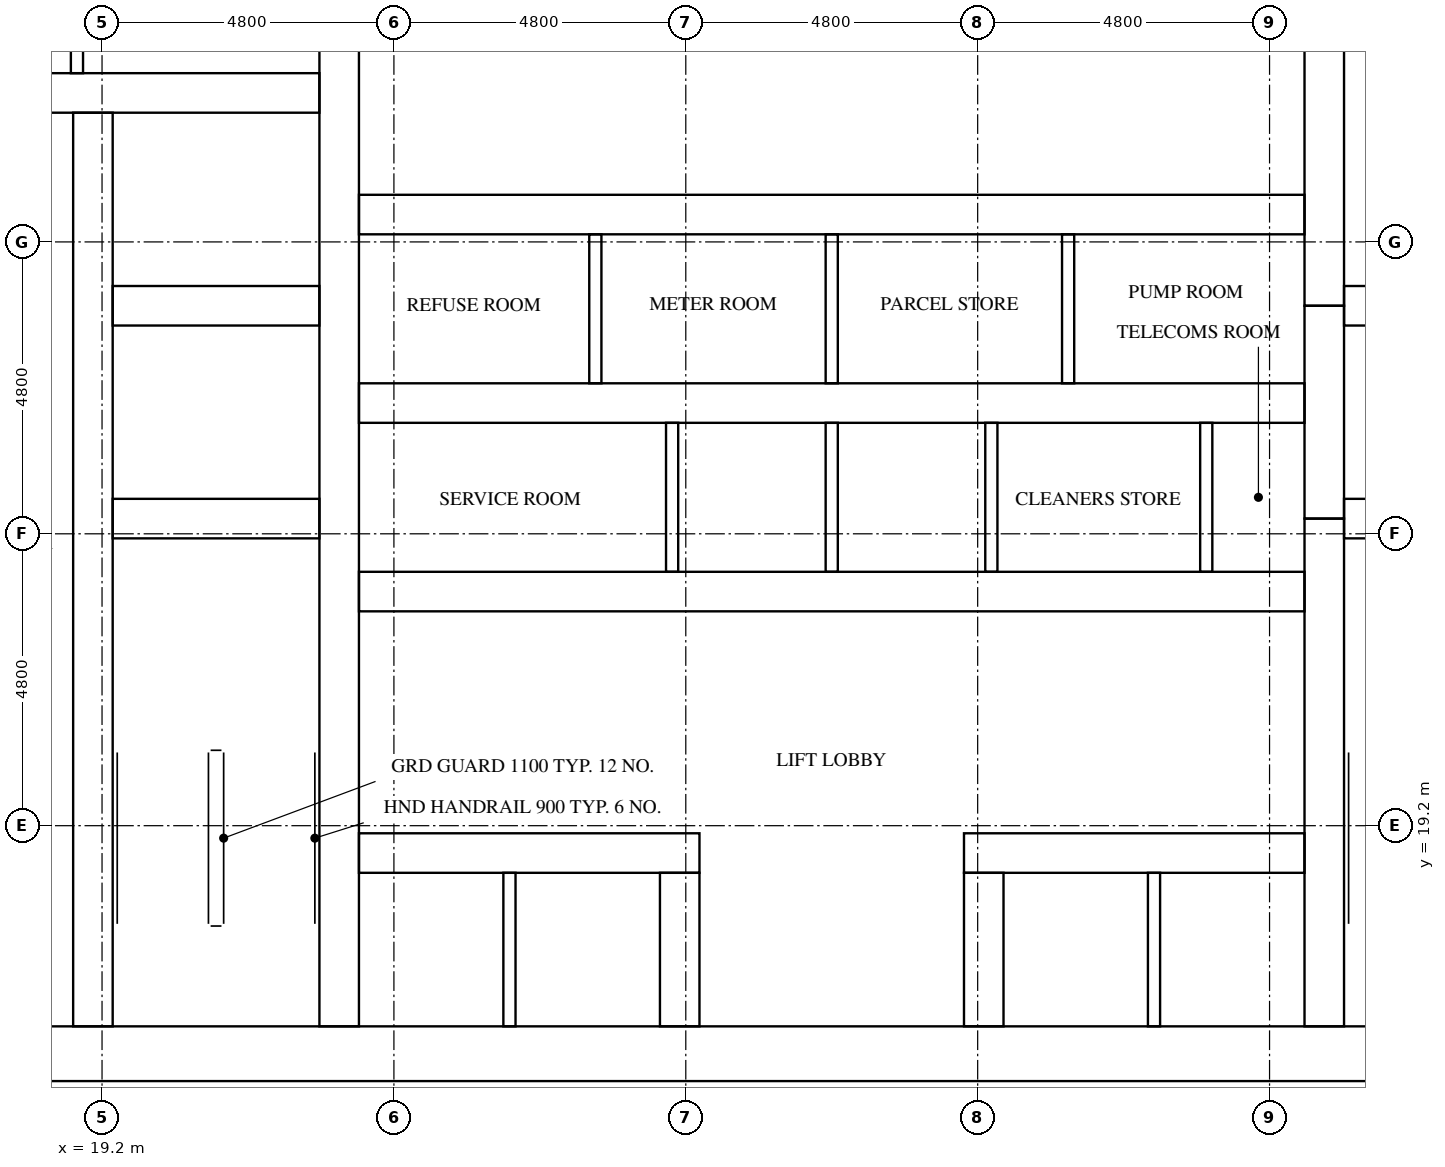
"""IFC4 building model, lengths in metres.
Left out: names, types, materials, properties, quantities, classifications, styles, units other than length and angle.
Written with IfcOpenShell. Run it as: python <this file> out.ifc"""

import sys

from ifc_helpers import new_model, si_unit, direction, frame, frame_2d, origin, place, context, subcontext, project, spatial, rectangle, extrude, element, fill, save


model = new_model("IFC4")
c1 = context("Model", 3, precision=1e-05, world=origin(), true_north=direction((0.0, 1.0)))
c2 = subcontext(c1, "Body", "Model", "MODEL_VIEW")
j1 = project(units=[si_unit("LENGTHUNIT", "METRE"), si_unit("PLANEANGLEUNIT", "RADIAN")], contexts=[c1])
p1 = place(None, origin())
s1 = spatial("IfcSite", under=j1, at=p1, CompositionType="ELEMENT")
p2 = place(p1, origin())
s2 = spatial("IfcBuilding", under=s1, at=p2, CompositionType="ELEMENT")
p3 = place(p2, frame((0.0, 0.0, 103.2)))
s3 = spatial("IfcBuildingStorey", under=s2, at=p3, CompositionType="ELEMENT", Elevation=103.2)
p4 = place(p3, frame((15.0, 15.45, 0.0), z_axis=(0.0, 0.0, 1.0), x_axis=(1.0, 0.0, 0.0)))
e1 = element("IfcWall", 1, at=p4, inside=s3, PredefinedType="SHEAR", context=c2, shape_type="SweptSolid", body=[
    extrude(rectangle(XDim=32.4, YDim=0.9, at=frame_2d((16.2, 0.0))), origin(), (0.0, 0.0, 1.0), 3.2),
])
p5 = place(p4, frame((15.3, 0.0, 0.0)))
e2 = element("IfcOpeningElement", 2, at=p5, cuts=e1, PredefinedType="OPENING", context=c2, shape_type="SweptSolid", body=[
    extrude(rectangle(XDim=1.8, YDim=2.1, at=frame_2d((0.9, 1.05))), frame((0.0, 0.46, 0.0), z_axis=(0.0, -1.0, 0.0), x_axis=(1.0, 0.0, 0.0)), (0.0, 0.0, 1.0), 0.92),
])
p6 = place(p3, frame((19.05, 15.9, 0.0), z_axis=(0.0, 0.0, 1.0), x_axis=(0.0, 1.0, 0.0)))
e3 = element("IfcWall", 3, at=p6, inside=s3, PredefinedType="SHEAR", context=c2, shape_type="SweptSolid", body=[
    extrude(rectangle(XDim=15.025, YDim=0.65, at=frame_2d((7.513, 0.0))), origin(), (0.0, 0.0, 1.0), 3.2),
])
p7 = place(p6, frame((9.55, 0.0, 0.0)))
e4 = element("IfcOpeningElement", 4, at=p7, cuts=e3, PredefinedType="OPENING", context=c2, shape_type="SweptSolid", body=[
    extrude(rectangle(XDim=1.1, YDim=2.1, at=frame_2d((0.55, 1.05))), frame((0.0, 0.335, 0.0), z_axis=(0.0, -1.0, 0.0), x_axis=(1.0, 0.0, 0.0)), (0.0, 0.0, 1.0), 0.67),
])
p8 = place(p6, frame((13.05, 0.0, 0.0)))
e5 = element("IfcOpeningElement", 5, at=p8, cuts=e3, PredefinedType="OPENING", context=c2, shape_type="SweptSolid", body=[
    extrude(rectangle(XDim=1.1, YDim=2.1, at=frame_2d((0.55, 1.05))), frame((0.0, 0.335, 0.0), z_axis=(0.0, -1.0, 0.0), x_axis=(1.0, 0.0, 0.0)), (0.0, 0.0, 1.0), 0.67),
])
p9 = place(p6, frame((0.3, 0.0, 0.0)))
e6 = element("IfcOpeningElement", 6, at=p9, cuts=e3, PredefinedType="OPENING", context=c2, shape_type="SweptSolid", body=[
    extrude(rectangle(XDim=1.2, YDim=2.1, at=frame_2d((0.6, 1.05))), frame((0.0, 0.335, 0.0), z_axis=(0.0, -1.0, 0.0), x_axis=(1.0, 0.0, 0.0)), (0.0, 0.0, 1.0), 0.67),
])
p10 = place(p3, frame((23.1, 15.9, 0.0), z_axis=(0.0, 0.0, 1.0), x_axis=(0.0, 1.0, 0.0)))
e7 = element("IfcWall", 7, at=p10, inside=s3, PredefinedType="SHEAR", context=c2, shape_type="SweptSolid", body=[
    extrude(rectangle(XDim=21.0, YDim=0.65, at=frame_2d((10.5, 0.0))), origin(), (0.0, 0.0, 1.0), 3.2),
])
p11 = place(p3, frame((39.3, 15.9, 0.0), z_axis=(0.0, 0.0, 1.0), x_axis=(0.0, 1.0, 0.0)))
e8 = element("IfcWall", 8, at=p11, inside=s3, PredefinedType="SHEAR", context=c2, shape_type="SweptSolid", body=[
    extrude(rectangle(XDim=8.35, YDim=0.65, at=frame_2d((4.175, 0.0))), origin(), (0.0, 0.0, 1.0), 3.2),
])
p12 = place(p3, frame((39.3, 24.25, 0.0), z_axis=(0.0, 0.0, 1.0), x_axis=(0.0, 1.0, 0.0)))
e9 = element("IfcWall", 9, at=p12, inside=s3, PredefinedType="SHEAR", context=c2, shape_type="SweptSolid", body=[
    extrude(rectangle(XDim=3.5, YDim=0.65, at=frame_2d((1.75, 0.0))), origin(), (0.0, 0.0, 1.0), 3.2),
])
p13 = place(p3, frame((39.3, 27.75, 0.0), z_axis=(0.0, 0.0, 1.0), x_axis=(0.0, 1.0, 0.0)))
e10 = element("IfcWall", 10, at=p13, inside=s3, PredefinedType="SHEAR", context=c2, shape_type="SweptSolid", body=[
    extrude(rectangle(XDim=9.15, YDim=0.65, at=frame_2d((4.575, 0.0))), origin(), (0.0, 0.0, 1.0), 3.2),
])
for number, where, z_axis, x_axis in (
    (11, (19.375, 24.25, 0.0), (0.0, 0.0, 1.0), (1.0, 0.0, 0.0)),
    (12, (19.375, 27.75, 0.0), (0.0, 0.0, 1.0), (1.0, 0.0, 0.0)),
):
    element("IfcWall", number, at=place(p3, frame(where, z_axis=z_axis, x_axis=x_axis)), inside=s3, PredefinedType="SHEAR", context=c2, shape_type="SweptSolid", body=[
        extrude(rectangle(XDim=3.4, YDim=0.65, at=frame_2d((1.7, 0.0))), origin(), (0.0, 0.0, 1.0), 3.2),
    ])
p14 = place(p3, frame((15.9, 31.25, 0.0), z_axis=(0.0, 0.0, 1.0), x_axis=(1.0, 0.0, 0.0)))
e13 = element("IfcWall", 13, at=p14, inside=s3, PredefinedType="SHEAR", context=c2, shape_type="SweptSolid", body=[
    extrude(rectangle(XDim=6.875, YDim=0.65, at=frame_2d((3.438, 0.0))), origin(), (0.0, 0.0, 1.0), 3.2),
])
for number, where, z_axis, x_axis in (
    (14, (39.625, 24.25, 0.0), (0.0, 0.0, 1.0), (1.0, 0.0, 0.0)),
    (15, (39.625, 27.75, 0.0), (0.0, 0.0, 1.0), (1.0, 0.0, 0.0)),
):
    element("IfcWall", number, at=place(p3, frame(where, z_axis=z_axis, x_axis=x_axis)), inside=s3, PredefinedType="SHEAR", context=c2, shape_type="SweptSolid", body=[
        extrude(rectangle(XDim=3.4, YDim=0.65, at=frame_2d((1.7, 0.0))), origin(), (0.0, 0.0, 1.0), 3.2),
    ])
p15 = place(p3, frame((23.425, 18.75, 0.0), z_axis=(0.0, 0.0, 1.0), x_axis=(1.0, 0.0, 0.0)))
e16 = element("IfcWall", 16, at=p15, inside=s3, PredefinedType="SHEAR", context=c2, shape_type="SweptSolid", body=[
    extrude(rectangle(XDim=5.6, YDim=0.65, at=frame_2d((2.8, 0.0))), origin(), (0.0, 0.0, 1.0), 3.2),
])
p16 = place(p15, frame((0.637, 0.0, 0.0)))
e17 = element("IfcOpeningElement", 17, at=p16, cuts=e16, PredefinedType="OPENING", context=c2, shape_type="SweptSolid", body=[
    extrude(rectangle(XDim=1.1, YDim=2.1, at=frame_2d((0.55, 1.05))), frame((0.0, 0.335, 0.0), z_axis=(0.0, -1.0, 0.0), x_axis=(1.0, 0.0, 0.0)), (0.0, 0.0, 1.0), 0.67),
])
p17 = place(p15, frame((3.212, 0.0, 0.0)))
e18 = element("IfcOpeningElement", 18, at=p17, cuts=e16, PredefinedType="OPENING", context=c2, shape_type="SweptSolid", body=[
    extrude(rectangle(XDim=1.1, YDim=2.1, at=frame_2d((0.55, 1.05))), frame((0.0, 0.335, 0.0), z_axis=(0.0, -1.0, 0.0), x_axis=(1.0, 0.0, 0.0)), (0.0, 0.0, 1.0), 0.67),
])
p18 = place(p3, frame((33.375, 18.75, 0.0), z_axis=(0.0, 0.0, 1.0), x_axis=(1.0, 0.0, 0.0)))
e19 = element("IfcWall", 19, at=p18, inside=s3, PredefinedType="SHEAR", context=c2, shape_type="SweptSolid", body=[
    extrude(rectangle(XDim=5.6, YDim=0.65, at=frame_2d((2.8, 0.0))), origin(), (0.0, 0.0, 1.0), 3.2),
])
p19 = place(p18, frame((1.288, 0.0, 0.0)))
e20 = element("IfcOpeningElement", 20, at=p19, cuts=e19, PredefinedType="OPENING", context=c2, shape_type="SweptSolid", body=[
    extrude(rectangle(XDim=1.1, YDim=2.1, at=frame_2d((0.55, 1.05))), frame((0.0, 0.335, 0.0), z_axis=(0.0, -1.0, 0.0), x_axis=(1.0, 0.0, 0.0)), (0.0, 0.0, 1.0), 0.67),
])
p20 = place(p18, frame((3.863, 0.0, 0.0)))
e21 = element("IfcOpeningElement", 21, at=p20, cuts=e19, PredefinedType="OPENING", context=c2, shape_type="SweptSolid", body=[
    extrude(rectangle(XDim=1.1, YDim=2.1, at=frame_2d((0.55, 1.05))), frame((0.0, 0.335, 0.0), z_axis=(0.0, -1.0, 0.0), x_axis=(1.0, 0.0, 0.0)), (0.0, 0.0, 1.0), 0.67),
])
p21 = place(p3, frame((23.425, 23.05, 0.0), z_axis=(0.0, 0.0, 1.0), x_axis=(1.0, 0.0, 0.0)))
e22 = element("IfcWall", 22, at=p21, inside=s3, PredefinedType="SHEAR", context=c2, shape_type="SweptSolid", body=[
    extrude(rectangle(XDim=15.55, YDim=0.65, at=frame_2d((7.775, 0.0))), origin(), (0.0, 0.0, 1.0), 3.2),
])
p22 = place(p21, frame((2.025, 0.0, 0.0)))
e23 = element("IfcOpeningElement", 23, at=p22, cuts=e22, PredefinedType="OPENING", context=c2, shape_type="SweptSolid", body=[
    extrude(rectangle(XDim=1.0, YDim=2.1, at=frame_2d((0.5, 1.05))), frame((0.0, 0.335, 0.0), z_axis=(0.0, -1.0, 0.0), x_axis=(1.0, 0.0, 0.0)), (0.0, 0.0, 1.0), 0.67),
])
p23 = place(p21, frame((11.667, 0.0, 0.0)))
e24 = element("IfcOpeningElement", 24, at=p23, cuts=e22, PredefinedType="OPENING", context=c2, shape_type="SweptSolid", body=[
    extrude(rectangle(XDim=1.0, YDim=2.1, at=frame_2d((0.5, 1.05))), frame((0.0, 0.335, 0.0), z_axis=(0.0, -1.0, 0.0), x_axis=(1.0, 0.0, 0.0)), (0.0, 0.0, 1.0), 0.67),
])
p24 = place(p21, frame((14.292, 0.0, 0.0)))
e25 = element("IfcOpeningElement", 25, at=p24, cuts=e22, PredefinedType="OPENING", context=c2, shape_type="SweptSolid", body=[
    extrude(rectangle(XDim=1.0, YDim=2.1, at=frame_2d((0.5, 1.05))), frame((0.0, 0.335, 0.0), z_axis=(0.0, -1.0, 0.0), x_axis=(1.0, 0.0, 0.0)), (0.0, 0.0, 1.0), 0.67),
])
p25 = place(p3, frame((23.425, 26.15, 0.0), z_axis=(0.0, 0.0, 1.0), x_axis=(1.0, 0.0, 0.0)))
e26 = element("IfcWall", 26, at=p25, inside=s3, PredefinedType="SHEAR", context=c2, shape_type="SweptSolid", body=[
    extrude(rectangle(XDim=15.55, YDim=0.65, at=frame_2d((7.775, 0.0))), origin(), (0.0, 0.0, 1.0), 3.2),
])
p26 = place(p3, frame((23.425, 29.25, 0.0), z_axis=(0.0, 0.0, 1.0), x_axis=(1.0, 0.0, 0.0)))
e27 = element("IfcWall", 27, at=p26, inside=s3, PredefinedType="SHEAR", context=c2, shape_type="SweptSolid", body=[
    extrude(rectangle(XDim=15.55, YDim=0.65, at=frame_2d((7.775, 0.0))), origin(), (0.0, 0.0, 1.0), 3.2),
])
p27 = place(p26, frame((1.394, 0.0, 0.0)))
e28 = element("IfcOpeningElement", 28, at=p27, cuts=e27, PredefinedType="OPENING", context=c2, shape_type="SweptSolid", body=[
    extrude(rectangle(XDim=1.0, YDim=2.1, at=frame_2d((0.5, 1.05))), frame((0.0, 0.335, 0.0), z_axis=(0.0, -1.0, 0.0), x_axis=(1.0, 0.0, 0.0)), (0.0, 0.0, 1.0), 0.67),
])
p28 = place(p26, frame((5.331, 0.0, 0.0)))
e29 = element("IfcOpeningElement", 29, at=p28, cuts=e27, PredefinedType="OPENING", context=c2, shape_type="SweptSolid", body=[
    extrude(rectangle(XDim=1.0, YDim=2.1, at=frame_2d((0.5, 1.05))), frame((0.0, 0.335, 0.0), z_axis=(0.0, -1.0, 0.0), x_axis=(1.0, 0.0, 0.0)), (0.0, 0.0, 1.0), 0.67),
])
p29 = place(p26, frame((9.219, 0.0, 0.0)))
e30 = element("IfcOpeningElement", 30, at=p29, cuts=e27, PredefinedType="OPENING", context=c2, shape_type="SweptSolid", body=[
    extrude(rectangle(XDim=1.0, YDim=2.1, at=frame_2d((0.5, 1.05))), frame((0.0, 0.335, 0.0), z_axis=(0.0, -1.0, 0.0), x_axis=(1.0, 0.0, 0.0)), (0.0, 0.0, 1.0), 0.67),
])
p30 = place(p26, frame((13.156, 0.0, 0.0)))
e31 = element("IfcOpeningElement", 31, at=p30, cuts=e27, PredefinedType="OPENING", context=c2, shape_type="SweptSolid", body=[
    extrude(rectangle(XDim=1.0, YDim=2.1, at=frame_2d((0.5, 1.05))), frame((0.0, 0.335, 0.0), z_axis=(0.0, -1.0, 0.0), x_axis=(1.0, 0.0, 0.0)), (0.0, 0.0, 1.0), 0.67),
])
for number, where, z_axis, x_axis in (
    (32, (28.7, 15.9, 0.0), (0.0, 0.0, 1.0), (0.0, 1.0, 0.0)),
    (33, (33.7, 15.9, 0.0), (0.0, 0.0, 1.0), (0.0, 1.0, 0.0)),
):
    element("IfcWall", number, at=place(p3, frame(where, z_axis=z_axis, x_axis=x_axis)), inside=s3, PredefinedType="SHEAR", context=c2, shape_type="SweptSolid", body=[
        extrude(rectangle(XDim=2.525, YDim=0.65, at=frame_2d((1.263, 0.0))), origin(), (0.0, 0.0, 1.0), 3.2),
    ])
for number, where, z_axis, x_axis in (
    (34, (28.575, 23.375, 0.0), (0.0, 0.0, 1.0), (0.0, 1.0, 0.0)),
    (35, (31.2, 23.375, 0.0), (0.0, 0.0, 1.0), (0.0, 1.0, 0.0)),
    (36, (33.825, 23.375, 0.0), (0.0, 0.0, 1.0), (0.0, 1.0, 0.0)),
):
    element("IfcWall", number, at=place(p3, frame(where, z_axis=z_axis, x_axis=x_axis)), inside=s3, PredefinedType="SOLIDWALL", context=c2, shape_type="SweptSolid", body=[
        extrude(rectangle(XDim=2.45, YDim=0.2, at=frame_2d((1.225, 0.0))), origin(), (0.0, 0.0, 1.0), 3.2),
    ])
for number, where, z_axis, x_axis in (
    (37, (25.9, 15.9, 0.0), (0.0, 0.0, 1.0), (0.0, 1.0, 0.0)),
    (38, (36.5, 15.9, 0.0), (0.0, 0.0, 1.0), (0.0, 1.0, 0.0)),
):
    element("IfcWall", number, at=place(p3, frame(where, z_axis=z_axis, x_axis=x_axis)), inside=s3, PredefinedType="SOLIDWALL", context=c2, shape_type="SweptSolid", body=[
        extrude(rectangle(XDim=2.525, YDim=0.2, at=frame_2d((1.263, 0.0))), origin(), (0.0, 0.0, 1.0), 3.2),
    ])
p31 = place(p3, frame((18.788, 31.575, 0.0), z_axis=(0.0, 0.0, 1.0), x_axis=(0.0, 1.0, 0.0)))
e39 = element("IfcWall", 39, at=p31, inside=s3, PredefinedType="PARTITIONING", context=c2, shape_type="SweptSolid", body=[
    extrude(rectangle(XDim=5.325, YDim=0.2, at=frame_2d((2.663, 0.0))), origin(), (0.0, 0.0, 1.0), 3.2),
])
for number, where, z_axis, x_axis in (
    (40, (37.359, 23.375, 0.0), (0.0, 0.0, 1.0), (0.0, 1.0, 0.0)),
    (41, (27.312, 26.475, 0.0), (0.0, 0.0, 1.0), (0.0, 1.0, 0.0)),
    (42, (31.2, 26.475, 0.0), (0.0, 0.0, 1.0), (0.0, 1.0, 0.0)),
    (43, (35.087, 26.475, 0.0), (0.0, 0.0, 1.0), (0.0, 1.0, 0.0)),
):
    element("IfcWall", number, at=place(p3, frame(where, z_axis=z_axis, x_axis=x_axis)), inside=s3, PredefinedType="PARTITIONING", context=c2, shape_type="SweptSolid", body=[
        extrude(rectangle(XDim=2.45, YDim=0.2, at=frame_2d((1.225, 0.0))), origin(), (0.0, 0.0, 1.0), 3.2),
    ])
p32 = place(p16, origin())
e44 = element("IfcDoor", 44, at=p32, inside=s3, OperationType="DOUBLE_DOOR_SLIDING", PredefinedType="DOOR", context=c2, shape_type="SweptSolid", body=[
    extrude(rectangle(XDim=1.1, YDim=2.1, at=frame_2d((0.55, 1.05))), frame((0.0, 0.025, 0.0), z_axis=(0.0, -1.0, 0.0), x_axis=(1.0, 0.0, 0.0)), (0.0, 0.0, 1.0), 0.05),
])
fill(e17, e44)
p33 = place(p17, origin())
e45 = element("IfcDoor", 45, at=p33, inside=s3, OperationType="DOUBLE_DOOR_SLIDING", PredefinedType="DOOR", context=c2, shape_type="SweptSolid", body=[
    extrude(rectangle(XDim=1.1, YDim=2.1, at=frame_2d((0.55, 1.05))), frame((0.0, 0.025, 0.0), z_axis=(0.0, -1.0, 0.0), x_axis=(1.0, 0.0, 0.0)), (0.0, 0.0, 1.0), 0.05),
])
fill(e18, e45)
p34 = place(p19, origin())
e46 = element("IfcDoor", 46, at=p34, inside=s3, OperationType="DOUBLE_DOOR_SLIDING", PredefinedType="DOOR", context=c2, shape_type="SweptSolid", body=[
    extrude(rectangle(XDim=1.1, YDim=2.1, at=frame_2d((0.55, 1.05))), frame((0.0, 0.025, 0.0), z_axis=(0.0, -1.0, 0.0), x_axis=(1.0, 0.0, 0.0)), (0.0, 0.0, 1.0), 0.05),
])
fill(e20, e46)
p35 = place(p20, origin())
e47 = element("IfcDoor", 47, at=p35, inside=s3, OperationType="DOUBLE_DOOR_SLIDING", PredefinedType="DOOR", context=c2, shape_type="SweptSolid", body=[
    extrude(rectangle(XDim=1.1, YDim=2.1, at=frame_2d((0.55, 1.05))), frame((0.0, 0.025, 0.0), z_axis=(0.0, -1.0, 0.0), x_axis=(1.0, 0.0, 0.0)), (0.0, 0.0, 1.0), 0.05),
])
fill(e21, e47)
p36 = place(p7, origin())
e48 = element("IfcDoor", 48, at=p36, inside=s3, OperationType="DOUBLE_DOOR_SLIDING", PredefinedType="DOOR", context=c2, shape_type="SweptSolid", body=[
    extrude(rectangle(XDim=1.1, YDim=2.1, at=frame_2d((0.55, 1.05))), frame((0.0, 0.025, 0.0), z_axis=(0.0, -1.0, 0.0), x_axis=(1.0, 0.0, 0.0)), (0.0, 0.0, 1.0), 0.05),
])
fill(e4, e48)
p37 = place(p8, origin())
e49 = element("IfcDoor", 49, at=p37, inside=s3, OperationType="DOUBLE_DOOR_SLIDING", PredefinedType="DOOR", context=c2, shape_type="SweptSolid", body=[
    extrude(rectangle(XDim=1.1, YDim=2.1, at=frame_2d((0.55, 1.05))), frame((0.0, 0.025, 0.0), z_axis=(0.0, -1.0, 0.0), x_axis=(1.0, 0.0, 0.0)), (0.0, 0.0, 1.0), 0.05),
])
fill(e5, e49)
p38 = place(p9, frame((1.2, 0.0, 0.0), z_axis=(0.0, 0.0, 1.0), x_axis=(-1.0, 0.0, 0.0)))
e50 = element("IfcDoor", 50, at=p38, inside=s3, OperationType="SINGLE_SWING_RIGHT", PredefinedType="DOOR", context=c2, shape_type="SweptSolid", body=[
    extrude(rectangle(XDim=1.2, YDim=2.1, at=frame_2d((0.6, 1.05))), frame((0.0, 0.025, 0.0), z_axis=(0.0, -1.0, 0.0), x_axis=(1.0, 0.0, 0.0)), (0.0, 0.0, 1.0), 0.05),
])
fill(e6, e50)
p39 = place(p5, frame((1.8, 0.0, 0.0), z_axis=(0.0, 0.0, 1.0), x_axis=(-1.0, 0.0, 0.0)))
e51 = element("IfcDoor", 51, at=p39, inside=s3, OperationType="DOUBLE_DOOR_SINGLE_SWING", PredefinedType="DOOR", context=c2, shape_type="SweptSolid", body=[
    extrude(rectangle(XDim=1.8, YDim=2.1, at=frame_2d((0.9, 1.05))), frame((0.0, 0.025, 0.0), z_axis=(0.0, -1.0, 0.0), x_axis=(1.0, 0.0, 0.0)), (0.0, 0.0, 1.0), 0.05),
])
fill(e2, e51)
p40 = place(p22, frame((1.0, 0.0, 0.0), z_axis=(0.0, 0.0, 1.0), x_axis=(-1.0, 0.0, 0.0)))
e52 = element("IfcDoor", 52, at=p40, inside=s3, OperationType="SINGLE_SWING_LEFT", PredefinedType="DOOR", context=c2, shape_type="SweptSolid", body=[
    extrude(rectangle(XDim=1.0, YDim=2.1, at=frame_2d((0.5, 1.05))), frame((0.0, 0.025, 0.0), z_axis=(0.0, -1.0, 0.0), x_axis=(1.0, 0.0, 0.0)), (0.0, 0.0, 1.0), 0.05),
])
fill(e23, e52)
p41 = place(p23, frame((1.0, 0.0, 0.0), z_axis=(0.0, 0.0, 1.0), x_axis=(-1.0, 0.0, 0.0)))
e53 = element("IfcDoor", 53, at=p41, inside=s3, OperationType="SINGLE_SWING_RIGHT", PredefinedType="DOOR", context=c2, shape_type="SweptSolid", body=[
    extrude(rectangle(XDim=1.0, YDim=2.1, at=frame_2d((0.5, 1.05))), frame((0.0, 0.025, 0.0), z_axis=(0.0, -1.0, 0.0), x_axis=(1.0, 0.0, 0.0)), (0.0, 0.0, 1.0), 0.05),
])
fill(e24, e53)
p42 = place(p24, frame((1.0, 0.0, 0.0), z_axis=(0.0, 0.0, 1.0), x_axis=(-1.0, 0.0, 0.0)))
e54 = element("IfcDoor", 54, at=p42, inside=s3, OperationType="SINGLE_SWING_LEFT", PredefinedType="DOOR", context=c2, shape_type="SweptSolid", body=[
    extrude(rectangle(XDim=1.0, YDim=2.1, at=frame_2d((0.5, 1.05))), frame((0.0, 0.025, 0.0), z_axis=(0.0, -1.0, 0.0), x_axis=(1.0, 0.0, 0.0)), (0.0, 0.0, 1.0), 0.05),
])
fill(e25, e54)
p43 = place(p27, origin())
e55 = element("IfcDoor", 55, at=p43, inside=s3, OperationType="SINGLE_SWING_RIGHT", PredefinedType="DOOR", context=c2, shape_type="SweptSolid", body=[
    extrude(rectangle(XDim=1.0, YDim=2.1, at=frame_2d((0.5, 1.05))), frame((0.0, 0.025, 0.0), z_axis=(0.0, -1.0, 0.0), x_axis=(1.0, 0.0, 0.0)), (0.0, 0.0, 1.0), 0.05),
])
fill(e28, e55)
p44 = place(p28, origin())
e56 = element("IfcDoor", 56, at=p44, inside=s3, OperationType="SINGLE_SWING_LEFT", PredefinedType="DOOR", context=c2, shape_type="SweptSolid", body=[
    extrude(rectangle(XDim=1.0, YDim=2.1, at=frame_2d((0.5, 1.05))), frame((0.0, 0.025, 0.0), z_axis=(0.0, -1.0, 0.0), x_axis=(1.0, 0.0, 0.0)), (0.0, 0.0, 1.0), 0.05),
])
fill(e29, e56)
p45 = place(p29, origin())
e57 = element("IfcDoor", 57, at=p45, inside=s3, OperationType="SINGLE_SWING_RIGHT", PredefinedType="DOOR", context=c2, shape_type="SweptSolid", body=[
    extrude(rectangle(XDim=1.0, YDim=2.1, at=frame_2d((0.5, 1.05))), frame((0.0, 0.025, 0.0), z_axis=(0.0, -1.0, 0.0), x_axis=(1.0, 0.0, 0.0)), (0.0, 0.0, 1.0), 0.05),
])
fill(e30, e57)
p46 = place(p30, origin())
e58 = element("IfcDoor", 58, at=p46, inside=s3, OperationType="SINGLE_SWING_LEFT", PredefinedType="DOOR", context=c2, shape_type="SweptSolid", body=[
    extrude(rectangle(XDim=1.0, YDim=2.1, at=frame_2d((0.5, 1.05))), frame((0.0, 0.025, 0.0), z_axis=(0.0, -1.0, 0.0), x_axis=(1.0, 0.0, 0.0)), (0.0, 0.0, 1.0), 0.05),
])
fill(e31, e58)
save(model, sys.argv[1])
